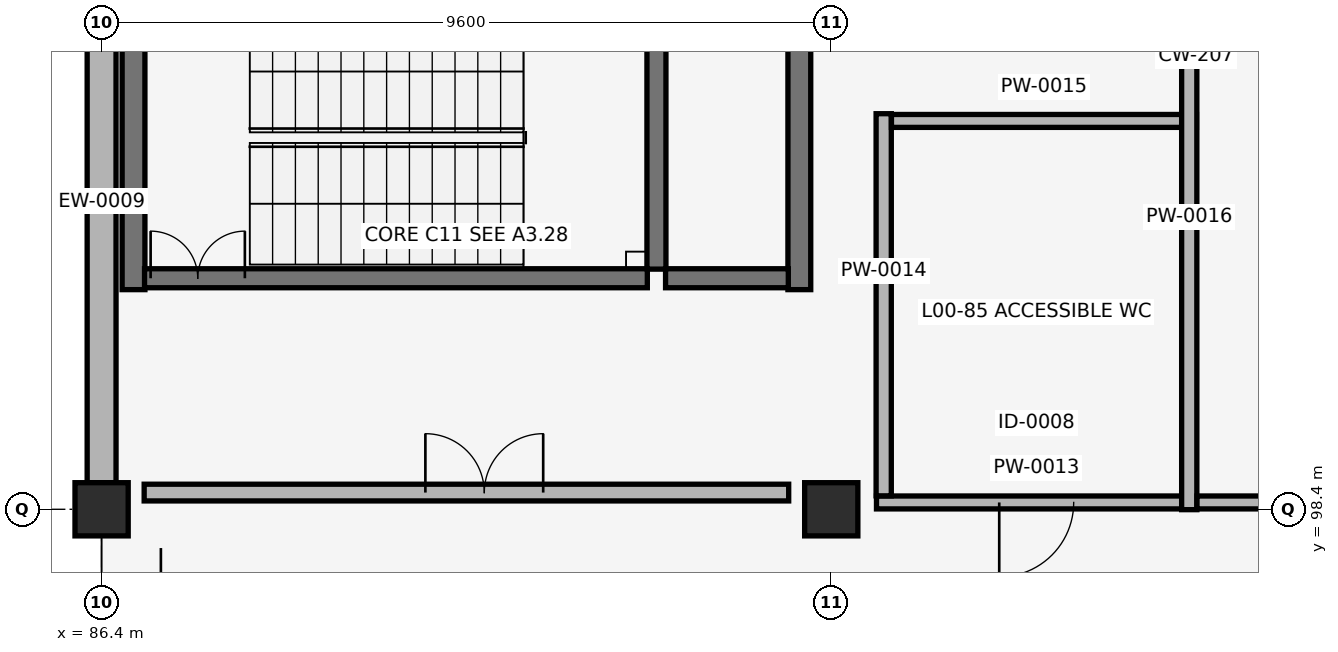
"""IFC4 building model, lengths in metres.
Left out: names, types, materials, properties, quantities, classifications, styles, units other than length and angle.
Written with IfcOpenShell. Run it as: python <this file> out.ifc"""

import sys

from ifc_helpers import new_model, si_unit, direction, frame, frame_2d, origin, origin_2d, place, context, subcontext, project, spatial, rectangle, circle, extrude, element, fill, save


model = new_model("IFC4")
c1 = context("Model", 3, precision=1e-05, world=origin(), true_north=direction((0.0, 1.0)))
c2 = subcontext(c1, "Body", "Model", "MODEL_VIEW")
j1 = project(units=[si_unit("LENGTHUNIT", "METRE"), si_unit("PLANEANGLEUNIT", "RADIAN")], contexts=[c1])
p1 = place(None, origin())
s1 = spatial("IfcSite", under=j1, at=p1, CompositionType="ELEMENT")
p2 = place(p1, origin())
s2 = spatial("IfcBuilding", under=s1, at=p2, CompositionType="ELEMENT")
p3 = place(p2, origin())
s3 = spatial("IfcBuildingStorey", under=s2, at=p3, CompositionType="ELEMENT", Elevation=0.0)
for number, where, z_axis, x_axis in (
    (1, (86.4, 98.4, -0.44), (0.0, 0.0, 1.0), (1.0, 0.0, 0.0)),
    (2, (96.0, 98.4, -0.44), (0.0, 0.0, 1.0), (1.0, 0.0, 0.0)),
):
    element("IfcColumn", number, at=place(p3, frame(where, z_axis=z_axis, x_axis=x_axis)), inside=s3, PredefinedType="COLUMN", context=c2, shape_type="SweptSolid", body=[
        extrude(circle(Radius=0.35, at=origin_2d()), origin(), (0.0, 0.0, 1.0), 4.86),
    ])
p4 = place(p3, frame((86.4, 105.25, 0.0), z_axis=(0.0, 0.0, 1.0), x_axis=(0.0, -1.0, 0.0)))
e3 = element("IfcWall", 3, at=p4, inside=s3, PredefinedType="SOLIDWALL", context=c2, shape_type="SweptSolid", body=[
    extrude(rectangle(XDim=6.5, YDim=0.38, at=frame_2d((3.25, 0.0))), origin(), (0.0, 0.0, 1.0), 3.37),
])
for number, where, z_axis, x_axis in (
    (4, (86.82, 101.29, 0.0), (0.0, 0.0, 1.0), (0.0, 1.0, 0.0)),
    (5, (95.58, 101.29, 0.0), (0.0, 0.0, 1.0), (0.0, 1.0, 0.0)),
):
    element("IfcWall", number, at=place(p3, frame(where, z_axis=z_axis, x_axis=x_axis)), inside=s3, PredefinedType="SHEAR", context=c2, shape_type="SweptSolid", body=[
        extrude(rectangle(XDim=4.1, YDim=0.3, at=frame_2d((2.05, 0.0))), origin(), (0.0, 0.0, 1.0), 4.14),
    ])
p5 = place(p3, frame((93.7, 101.56, 0.0), z_axis=(0.0, 0.0, 1.0), x_axis=(0.0, 1.0, 0.0)))
e6 = element("IfcWall", 6, at=p5, inside=s3, PredefinedType="SHEAR", context=c2, shape_type="SweptSolid", body=[
    extrude(rectangle(XDim=3.53, YDim=0.25, at=frame_2d((1.765, 0.0))), origin(), (0.0, 0.0, 1.0), 4.14),
])
p6 = place(p3, frame((86.965, 101.44, 0.0), z_axis=(0.0, 0.0, 1.0), x_axis=(1.0, 0.0, 0.0)))
e7 = element("IfcWall", 7, at=p6, inside=s3, PredefinedType="SHEAR", context=c2, shape_type="SweptSolid", body=[
    extrude(rectangle(XDim=6.615, YDim=0.25, at=frame_2d((3.308, 0.0))), origin(), (0.0, 0.0, 1.0), 4.14),
])
p7 = place(p6, frame((0.08, 0.0, 0.0)))
e8 = element("IfcOpeningElement", 8, at=p7, cuts=e7, PredefinedType="OPENING", context=c2, shape_type="SweptSolid", body=[
    extrude(rectangle(XDim=1.24, YDim=2.15, at=frame_2d((0.62, 1.075))), frame((0.0, 0.135, 0.0), z_axis=(0.0, -1.0, 0.0), x_axis=(1.0, 0.0, 0.0)), (0.0, 0.0, 1.0), 0.27),
])
p8 = place(p3, frame((86.96, 98.62, 0.0), z_axis=(0.0, 0.0, 1.0), x_axis=(1.0, 0.0, 0.0)))
e9 = element("IfcWall", 9, at=p8, inside=s3, PredefinedType="PARTITIONING", context=c2, shape_type="SweptSolid", body=[
    extrude(rectangle(XDim=8.48, YDim=0.22, at=frame_2d((4.24, 0.0))), origin(), (0.0, 0.0, 1.0), 3.42),
])
p9 = place(p8, frame((3.7, 0.0, 0.0)))
e10 = element("IfcOpeningElement", 10, at=p9, cuts=e9, PredefinedType="OPENING", context=c2, shape_type="SweptSolid", body=[
    extrude(rectangle(XDim=1.55, YDim=2.2, at=frame_2d((0.775, 1.1))), frame((0.0, 0.12, 0.0), z_axis=(0.0, -1.0, 0.0), x_axis=(1.0, 0.0, 0.0)), (0.0, 0.0, 1.0), 0.24),
])
p10 = place(p3, frame((93.82, 101.44, 0.0), z_axis=(0.0, 0.0, 1.0), x_axis=(1.0, 0.0, 0.0)))
e11 = element("IfcWall", 11, at=p10, inside=s3, PredefinedType="SHEAR", context=c2, shape_type="SweptSolid", body=[
    extrude(rectangle(XDim=1.615, YDim=0.25, at=frame_2d((0.808, 0.0))), origin(), (0.0, 0.0, 1.0), 4.14),
])
p11 = place(p3, frame((96.595, 98.49, 0.0), z_axis=(0.0, 0.0, 1.0), x_axis=(1.0, 0.0, 0.0)))
e12 = element("IfcWall", 12, at=p11, inside=s3, PredefinedType="PLUMBINGWALL", context=c2, shape_type="SweptSolid", body=[
    extrude(rectangle(XDim=4.21, YDim=0.17, at=frame_2d((2.105, 0.0))), origin(), (0.0, 0.0, 1.0), 3.42),
])
p12 = place(p11, frame((1.615, 0.0, 0.0)))
e13 = element("IfcOpeningElement", 13, at=p12, cuts=e12, PredefinedType="OPENING", context=c2, shape_type="SweptSolid", body=[
    extrude(rectangle(XDim=0.98, YDim=2.08, at=frame_2d((0.49, 1.04))), frame((0.0, 0.095, 0.0), z_axis=(0.0, -1.0, 0.0), x_axis=(1.0, 0.0, 0.0)), (0.0, 0.0, 1.0), 0.19),
])
p13 = place(p3, frame((96.69, 98.577, 0.0), z_axis=(0.0, 0.0, 1.0), x_axis=(0.0, 1.0, 0.0)))
e14 = element("IfcWall", 14, at=p13, inside=s3, PredefinedType="PLUMBINGWALL", context=c2, shape_type="SweptSolid", body=[
    extrude(rectangle(XDim=5.028, YDim=0.2, at=frame_2d((2.514, 0.0))), origin(), (0.0, 0.0, 1.0), 3.42),
])
p14 = place(p3, frame((96.792, 103.51, 0.0), z_axis=(0.0, 0.0, 1.0), x_axis=(1.0, 0.0, 0.0)))
e15 = element("IfcWall", 15, at=p14, inside=s3, PredefinedType="PLUMBINGWALL", context=c2, shape_type="SweptSolid", body=[
    extrude(rectangle(XDim=4.013, YDim=0.17, at=frame_2d((2.006, 0.0))), origin(), (0.0, 0.0, 1.0), 3.46),
])
p15 = place(p3, frame((100.71, 98.395, 0.0), z_axis=(0.0, 0.0, 1.0), x_axis=(0.0, 1.0, 0.0)))
e16 = element("IfcWall", 16, at=p15, inside=s3, PredefinedType="PLUMBINGWALL", context=c2, shape_type="SweptSolid", body=[
    extrude(rectangle(XDim=6.81, YDim=0.2, at=frame_2d((3.405, 0.0))), origin(), (0.0, 0.0, 1.0), 3.42),
])
p16 = place(p3, frame((100.812, 98.49, 0.0), z_axis=(0.0, 0.0, 1.0), x_axis=(1.0, 0.0, 0.0)))
e17 = element("IfcWall", 17, at=p16, inside=s3, PredefinedType="PLUMBINGWALL", context=c2, shape_type="SweptSolid", body=[
    extrude(rectangle(XDim=4.196, YDim=0.17, at=frame_2d((2.098, 0.0))), origin(), (0.0, 0.0, 1.0), 3.42),
])
p17 = place(p16, frame((1.638, 0.0, 0.0)))
e18 = element("IfcOpeningElement", 18, at=p17, cuts=e17, PredefinedType="OPENING", context=c2, shape_type="SweptSolid", body=[
    extrude(rectangle(XDim=0.92, YDim=2.08, at=frame_2d((0.46, 1.04))), frame((0.0, 0.095, 0.0), z_axis=(0.0, -1.0, 0.0), x_axis=(1.0, 0.0, 0.0)), (0.0, 0.0, 1.0), 0.19),
])
p18 = place(p7, origin())
e19 = element("IfcDoor", 19, at=p18, inside=s3, OperationType="DOUBLE_DOOR_SINGLE_SWING", PredefinedType="DOOR", context=c2, shape_type="SweptSolid", body=[
    extrude(rectangle(XDim=1.24, YDim=2.15, at=frame_2d((0.62, 1.075))), frame((0.0, 0.025, 0.0), z_axis=(0.0, -1.0, 0.0), x_axis=(1.0, 0.0, 0.0)), (0.0, 0.0, 1.0), 0.05),
])
fill(e8, e19)
p19 = place(p9, origin())
e20 = element("IfcDoor", 20, at=p19, inside=s3, OperationType="DOUBLE_DOOR_SINGLE_SWING", PredefinedType="DOOR", context=c2, shape_type="SweptSolid", body=[
    extrude(rectangle(XDim=1.55, YDim=2.2, at=frame_2d((0.775, 1.1))), frame((0.0, 0.025, 0.0), z_axis=(0.0, -1.0, 0.0), x_axis=(1.0, 0.0, 0.0)), (0.0, 0.0, 1.0), 0.05),
])
fill(e10, e20)
p20 = place(p12, origin())
e21 = element("IfcDoor", 21, at=p20, inside=s3, OperationType="SINGLE_SWING_RIGHT", PredefinedType="DOOR", context=c2, shape_type="SweptSolid", body=[
    extrude(rectangle(XDim=0.98, YDim=2.08, at=frame_2d((0.49, 1.04))), frame((0.0, 0.025, 0.0), z_axis=(0.0, -1.0, 0.0), x_axis=(1.0, 0.0, 0.0)), (0.0, 0.0, 1.0), 0.05),
])
fill(e13, e21)
save(model, sys.argv[1])
